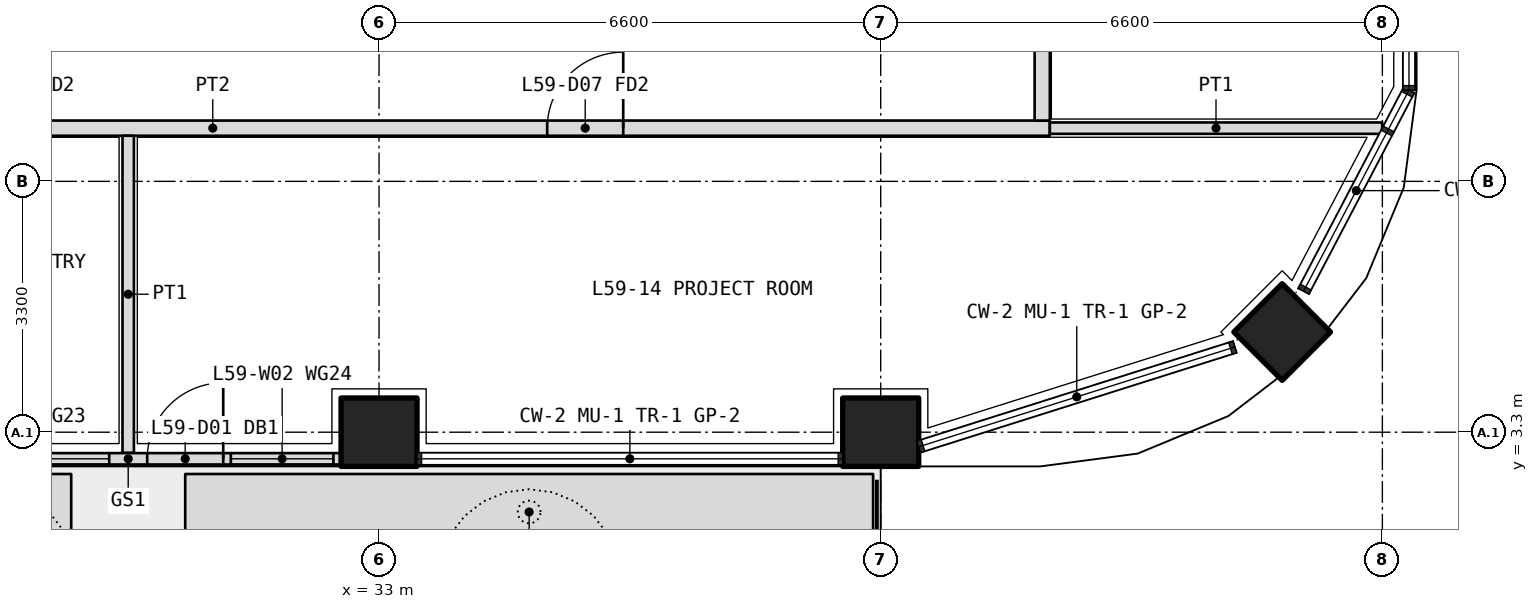
"""IFC4 building model, lengths in metres.
Left out: names, types, materials, properties, quantities, classifications, styles, units other than length and angle.
Written with IfcOpenShell. Run it as: python <this file> out.ifc"""

import sys

from ifc_helpers import new_model, si_unit, direction, frame, frame_2d, origin, origin_2d, place, context, subcontext, project, spatial, polyline, rectangle, outline, extrude, element, fill, save


model = new_model("IFC4")
c1 = context("Model", 3, precision=1e-05, world=origin(), true_north=direction((0.0, 1.0)))
c2 = subcontext(c1, "Body", "Model", "MODEL_VIEW")
j1 = project(units=[si_unit("LENGTHUNIT", "METRE"), si_unit("PLANEANGLEUNIT", "RADIAN")], contexts=[c1])
p1 = place(None, origin())
s1 = spatial("IfcSite", under=j1, at=p1, CompositionType="ELEMENT")
p2 = place(p1, origin())
s2 = spatial("IfcBuilding", under=s1, at=p2, CompositionType="ELEMENT")
p3 = place(p2, frame((0.0, 0.0, 258.6)))
s3 = spatial("IfcBuildingStorey", under=s2, at=p3, CompositionType="ELEMENT", Elevation=258.6)
p4 = place(p3, frame((44.882, 4.618, 0.0), z_axis=(0.0, 0.0, 1.0), x_axis=(0.707106781187, 0.707106781187, 0.0)))
e1 = element("IfcColumn", 1, at=p4, inside=s3, PredefinedType="COLUMN", context=c2, shape_type="SweptSolid", body=[
    extrude(rectangle(XDim=0.9, YDim=0.9, at=origin_2d()), origin(), (0.0, 0.0, 1.0), 4.2),
])
for number, where, z_axis, x_axis in (
    (2, (33.0, 3.3, 0.0), (0.0, 0.0, 1.0), (1.0, 0.0, 0.0)),
    (3, (39.6, 3.3, 0.0), (0.0, 0.0, 1.0), (1.0, 0.0, 0.0)),
):
    element("IfcColumn", number, at=place(p3, frame(where, z_axis=z_axis, x_axis=x_axis)), inside=s3, PredefinedType="COLUMN", context=c2, shape_type="SweptSolid", body=[
        extrude(rectangle(XDim=1.0, YDim=0.9, at=origin_2d()), origin(), (0.0, 0.0, 1.0), 4.2),
    ])
p5 = place(p3, origin())
e4 = element("IfcWall", 4, at=p5, inside=s3, PredefinedType="USERDEFINED", context=c2, shape_type="SweptSolid", body=[
    extrude(outline(polyline([(26.5, 1.75), (28.95, 1.75), (28.95, 2.75), (26.5, 2.75), (26.5, 1.75)]), holes=[polyline([(26.65, 1.9), (28.8, 1.9), (28.8, 2.6), (26.65, 2.6), (26.65, 1.9)])]), origin(), (0.0, 0.0, 1.0), 1.05),
])
p6 = place(p3, origin())
e5 = element("IfcWall", 5, at=p6, inside=s3, PredefinedType="USERDEFINED", context=c2, shape_type="SweptSolid", body=[
    extrude(outline(polyline([(30.45, 1.75), (39.5, 1.75), (39.5, 2.75), (30.45, 2.75), (30.45, 1.75)]), holes=[polyline([(30.6, 1.9), (39.35, 1.9), (39.35, 2.6), (30.6, 2.6), (30.6, 1.9)])]), origin(), (0.0, 0.0, 1.0), 1.05),
])
p7 = place(p3, frame((26.9, 2.95, 0.0), z_axis=(0.0, 0.0, 1.0), x_axis=(1.0, 0.0, 0.0)))
e6 = element("IfcWall", 6, at=p7, inside=s3, PredefinedType="SOLIDWALL", context=c2, shape_type="SweptSolid", body=[
    extrude(rectangle(XDim=5.6, YDim=0.15, at=frame_2d((2.8, 0.0))), origin(), (0.0, 0.0, 1.0), 2.7),
])
p8 = place(p7, frame((3.05, 0.0, 0.0)))
e7 = element("IfcOpeningElement", 7, at=p8, cuts=e6, PredefinedType="OPENING", context=c2, shape_type="SweptSolid", body=[
    extrude(rectangle(XDim=1.0, YDim=2.4, at=frame_2d((0.5, 1.2))), frame((0.0, 0.085, 0.0), z_axis=(0.0, -1.0, 0.0), x_axis=(1.0, 0.0, 0.0)), (0.0, 0.0, 1.0), 0.17),
])
p9 = place(p7, frame((0.1, 0.0, 0.1)))
e8 = element("IfcOpeningElement", 8, at=p9, cuts=e6, PredefinedType="OPENING", context=c2, shape_type="SweptSolid", body=[
    extrude(rectangle(XDim=2.45, YDim=2.3, at=frame_2d((1.225, 1.15))), frame((0.0, 0.085, 0.0), z_axis=(0.0, -1.0, 0.0), x_axis=(1.0, 0.0, 0.0)), (0.0, 0.0, 1.0), 0.17),
])
p10 = place(p7, frame((4.15, 0.0, 0.1)))
e9 = element("IfcOpeningElement", 9, at=p10, cuts=e6, PredefinedType="OPENING", context=c2, shape_type="SweptSolid", body=[
    extrude(rectangle(XDim=1.35, YDim=2.3, at=frame_2d((0.675, 1.15))), frame((0.0, 0.085, 0.0), z_axis=(0.0, -1.0, 0.0), x_axis=(1.0, 0.0, 0.0)), (0.0, 0.0, 1.0), 0.17),
])
p11 = place(p3, frame((19.8, 7.3, 0.0), z_axis=(0.0, 0.0, 1.0), x_axis=(1.0, 0.0, 0.0)))
e10 = element("IfcWall", 10, at=p11, inside=s3, PredefinedType="PARTITIONING", context=c2, shape_type="SweptSolid", body=[
    extrude(rectangle(XDim=22.025, YDim=0.2, at=frame_2d((11.012, 0.0))), origin(), (0.0, 0.0, 1.0), 3.0),
])
p12 = place(p11, frame((1.15, 0.0, 0.0)))
e11 = element("IfcOpeningElement", 11, at=p12, cuts=e10, PredefinedType="OPENING", context=c2, shape_type="SweptSolid", body=[
    extrude(rectangle(XDim=1.0, YDim=2.1, at=frame_2d((0.5, 1.05))), frame((0.0, 0.11, 0.0), z_axis=(0.0, -1.0, 0.0), x_axis=(1.0, 0.0, 0.0)), (0.0, 0.0, 1.0), 0.22),
])
p13 = place(p11, frame((4.55, 0.0, 0.0)))
e12 = element("IfcOpeningElement", 12, at=p13, cuts=e10, PredefinedType="OPENING", context=c2, shape_type="SweptSolid", body=[
    extrude(rectangle(XDim=1.0, YDim=2.1, at=frame_2d((0.5, 1.05))), frame((0.0, 0.11, 0.0), z_axis=(0.0, -1.0, 0.0), x_axis=(1.0, 0.0, 0.0)), (0.0, 0.0, 1.0), 0.22),
])
p14 = place(p11, frame((7.85, 0.0, 0.0)))
e13 = element("IfcOpeningElement", 13, at=p14, cuts=e10, PredefinedType="OPENING", context=c2, shape_type="SweptSolid", body=[
    extrude(rectangle(XDim=1.0, YDim=2.1, at=frame_2d((0.5, 1.05))), frame((0.0, 0.11, 0.0), z_axis=(0.0, -1.0, 0.0), x_axis=(1.0, 0.0, 0.0)), (0.0, 0.0, 1.0), 0.22),
])
p15 = place(p11, frame((15.413, 0.0, 0.0)))
e14 = element("IfcOpeningElement", 14, at=p15, cuts=e10, PredefinedType="OPENING", context=c2, shape_type="SweptSolid", body=[
    extrude(rectangle(XDim=1.0, YDim=2.1, at=frame_2d((0.5, 1.05))), frame((0.0, 0.11, 0.0), z_axis=(0.0, -1.0, 0.0), x_axis=(1.0, 0.0, 0.0)), (0.0, 0.0, 1.0), 0.22),
])
p16 = place(p3, frame((41.725, 7.4, 0.0), z_axis=(0.0, 0.0, 1.0), x_axis=(0.0, 1.0, 0.0)))
e15 = element("IfcWall", 15, at=p16, inside=s3, PredefinedType="PARTITIONING", context=c2, shape_type="SweptSolid", body=[
    extrude(rectangle(XDim=31.4, YDim=0.2, at=frame_2d((15.7, 0.0))), origin(), (0.0, 0.0, 1.0), 3.0),
])
p17 = place(p16, frame((5.65, 0.0, 0.0)))
e16 = element("IfcOpeningElement", 16, at=p17, cuts=e15, PredefinedType="OPENING", context=c2, shape_type="SweptSolid", body=[
    extrude(rectangle(XDim=1.0, YDim=2.1, at=frame_2d((0.5, 1.05))), frame((0.0, 0.11, 0.0), z_axis=(0.0, -1.0, 0.0), x_axis=(1.0, 0.0, 0.0)), (0.0, 0.0, 1.0), 0.22),
])
p18 = place(p16, frame((13.4, 0.0, 0.0)))
e17 = element("IfcOpeningElement", 17, at=p18, cuts=e15, PredefinedType="OPENING", context=c2, shape_type="SweptSolid", body=[
    extrude(rectangle(XDim=1.0, YDim=2.1, at=frame_2d((0.5, 1.05))), frame((0.0, 0.11, 0.0), z_axis=(0.0, -1.0, 0.0), x_axis=(1.0, 0.0, 0.0)), (0.0, 0.0, 1.0), 0.22),
])
p19 = place(p16, frame((16.75, 0.0, 0.0)))
e18 = element("IfcOpeningElement", 18, at=p19, cuts=e15, PredefinedType="OPENING", context=c2, shape_type="SweptSolid", body=[
    extrude(rectangle(XDim=0.9, YDim=2.1, at=frame_2d((0.45, 1.05))), frame((0.0, 0.11, 0.0), z_axis=(0.0, -1.0, 0.0), x_axis=(1.0, 0.0, 0.0)), (0.0, 0.0, 1.0), 0.22),
])
p20 = place(p16, frame((24.65, 0.0, 0.0)))
e19 = element("IfcOpeningElement", 19, at=p20, cuts=e15, PredefinedType="OPENING", context=c2, shape_type="SweptSolid", body=[
    extrude(rectangle(XDim=1.2, YDim=2.1, at=frame_2d((0.6, 1.05))), frame((0.0, 0.11, 0.0), z_axis=(0.0, -1.0, 0.0), x_axis=(1.0, 0.0, 0.0)), (0.0, 0.0, 1.0), 0.22),
])
p21 = place(p3, frame((46.198, 7.3, 0.0), z_axis=(0.0, 0.0, 1.0), x_axis=(-1.0, 0.0, 0.0)))
e20 = element("IfcWall", 20, at=p21, inside=s3, PredefinedType="PARTITIONING", context=c2, shape_type="SweptSolid", body=[
    extrude(rectangle(XDim=4.373, YDim=0.15, at=frame_2d((2.186, 0.0))), origin(), (0.0, 0.0, 1.0), 2.7),
])
p22 = place(p3, frame((29.7, 3.03, 0.0), z_axis=(0.0, 0.0, 1.0), x_axis=(0.0, 1.0, 0.0)))
e21 = element("IfcWall", 21, at=p22, inside=s3, PredefinedType="PARTITIONING", context=c2, shape_type="SweptSolid", body=[
    extrude(rectangle(XDim=4.17, YDim=0.15, at=frame_2d((2.085, 0.0))), origin(), (0.0, 0.0, 1.0), 2.7),
])
p23 = place(p8, origin())
e22 = element("IfcDoor", 22, at=p23, inside=s3, OperationType="SINGLE_SWING_RIGHT", PredefinedType="DOOR", context=c2, shape_type="SweptSolid", body=[
    extrude(rectangle(XDim=1.0, YDim=2.4, at=frame_2d((0.5, 1.2))), frame((0.0, 0.025, 0.0), z_axis=(0.0, -1.0, 0.0), x_axis=(1.0, 0.0, 0.0)), (0.0, 0.0, 1.0), 0.05),
])
fill(e7, e22)
p24 = place(p9, origin())
e23 = element("IfcWindow", 23, at=p24, inside=s3, PartitioningType="SINGLE_PANEL", PredefinedType="WINDOW", context=c2, shape_type="SweptSolid", body=[
    extrude(rectangle(XDim=2.45, YDim=2.3, at=frame_2d((1.225, 1.15))), frame((0.0, 0.03, 0.0), z_axis=(0.0, -1.0, 0.0), x_axis=(1.0, 0.0, 0.0)), (0.0, 0.0, 1.0), 0.06),
])
fill(e8, e23)
p25 = place(p10, origin())
e24 = element("IfcWindow", 24, at=p25, inside=s3, PartitioningType="SINGLE_PANEL", PredefinedType="WINDOW", context=c2, shape_type="SweptSolid", body=[
    extrude(rectangle(XDim=1.35, YDim=2.3, at=frame_2d((0.675, 1.15))), frame((0.0, 0.03, 0.0), z_axis=(0.0, -1.0, 0.0), x_axis=(1.0, 0.0, 0.0)), (0.0, 0.0, 1.0), 0.06),
])
fill(e9, e24)
p26 = place(p15, origin())
e25 = element("IfcDoor", 25, at=p26, inside=s3, OperationType="SINGLE_SWING_RIGHT", PredefinedType="DOOR", context=c2, shape_type="SweptSolid", body=[
    extrude(rectangle(XDim=1.0, YDim=2.1, at=frame_2d((0.5, 1.05))), frame((0.0, 0.025, 0.0), z_axis=(0.0, -1.0, 0.0), x_axis=(1.0, 0.0, 0.0)), (0.0, 0.0, 1.0), 0.05),
])
fill(e14, e25)
save(model, sys.argv[1])
